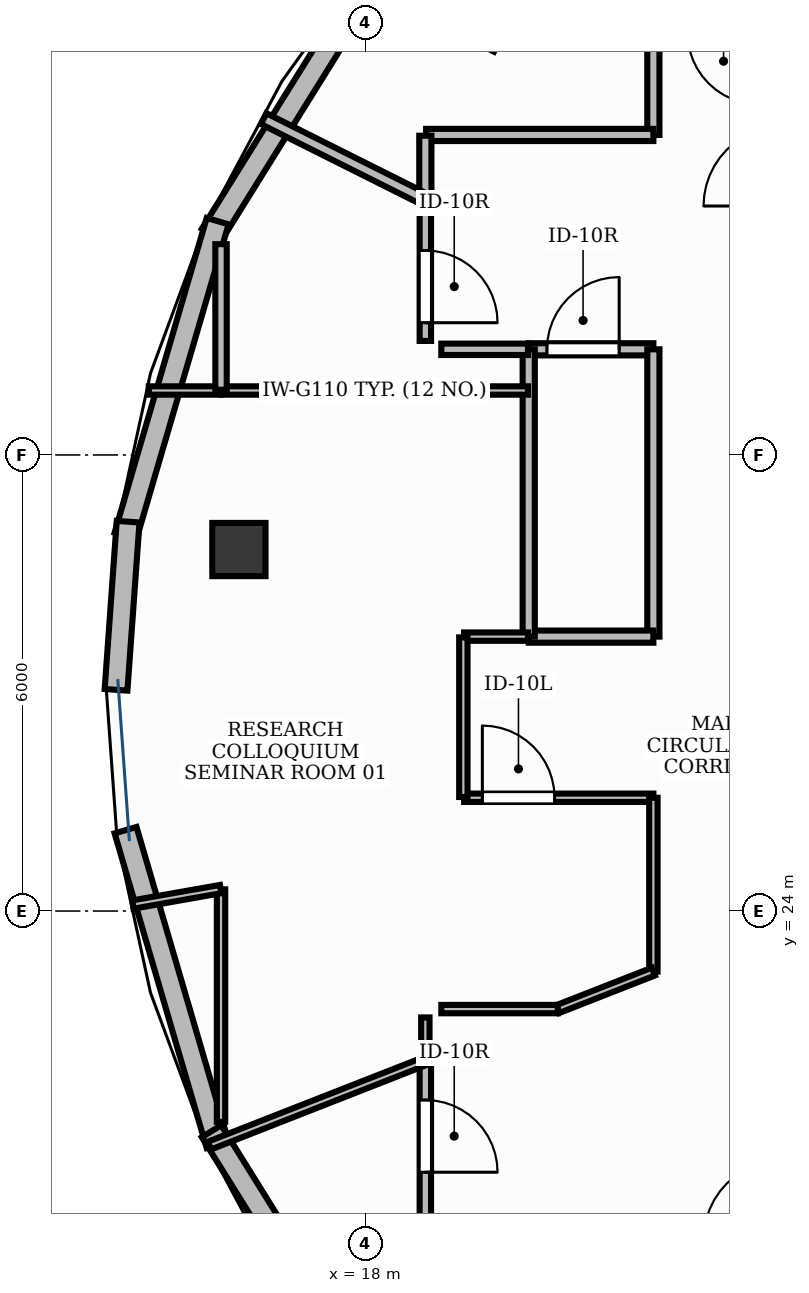
"""IFC4 building model, lengths in metres.
Left out: names, types, materials, properties, quantities, classifications, styles, units other than length and angle.
Written with IfcOpenShell. Run it as: python <this file> out.ifc"""

import sys

from ifc_helpers import new_model, si_unit, direction, frame, frame_2d, origin, origin_2d, place, context, subcontext, project, spatial, rectangle, extrude, element, fill, save


model = new_model("IFC4")
c1 = context("Model", 3, precision=1e-05, world=origin(), true_north=direction((0.0, 1.0)))
c2 = subcontext(c1, "Body", "Model", "MODEL_VIEW")
j1 = project(units=[si_unit("LENGTHUNIT", "METRE"), si_unit("PLANEANGLEUNIT", "RADIAN")], contexts=[c1])
p1 = place(None, origin())
s1 = spatial("IfcSite", under=j1, at=p1, CompositionType="ELEMENT")
p2 = place(p1, origin())
s2 = spatial("IfcBuilding", under=s1, at=p2, CompositionType="ELEMENT")
p3 = place(p2, frame((0.0, 0.0, 331.2)))
s3 = spatial("IfcBuildingStorey", under=s2, at=p3, CompositionType="ELEMENT", Elevation=331.2)
p4 = place(p3, frame((16.337, 28.756, -0.0), z_axis=(0.0, 0.0, 1.0), x_axis=(0.0, 1.0, 0.0)))
e1 = element("IfcColumn", 1, at=p4, inside=s3, PredefinedType="COLUMN", context=c2, shape_type="SweptSolid", body=[
    extrude(rectangle(XDim=0.7, YDim=0.7, at=origin_2d()), origin(), (0.0, 0.0, 1.0), 3.881),
])
p5 = place(p3, frame((18.327, 36.671, 0.0), z_axis=(0.0, 0.0, 1.0), x_axis=(-0.528532323195, -0.848913177739, 0.0)))
e2 = element("IfcWall", 2, at=p5, inside=s3, PredefinedType="STANDARD", context=c2, shape_type="SweptSolid", body=[
    extrude(rectangle(XDim=4.447, YDim=0.3, at=frame_2d((2.223, 0.0))), origin(), (0.0, 0.0, 1.0), 3.88),
])
p6 = place(p3, frame((16.057, 33.076, 0.0), z_axis=(0.0, 0.0, 1.0), x_axis=(-0.280777958988, -0.95977275318, 0.0)))
e3 = element("IfcWall", 3, at=p6, inside=s3, PredefinedType="STANDARD", context=c2, shape_type="SweptSolid", body=[
    extrude(rectangle(XDim=4.314, YDim=0.3, at=frame_2d((2.157, 0.0))), origin(), (0.0, 0.0, 1.0), 3.88),
])
p7 = place(p3, frame((14.88, 29.122, 0.0), z_axis=(0.0, 0.0, 1.0), x_axis=(-0.071669526478, -0.997428433009, 0.0)))
e4 = element("IfcWall", 4, at=p7, inside=s3, PredefinedType="STANDARD", context=c2, shape_type="SweptSolid", body=[
    extrude(rectangle(XDim=2.218, YDim=0.3, at=frame_2d((1.109, 0.0))), origin(), (0.0, 0.0, 1.0), 3.88),
])
p8 = place(p3, frame((14.846, 25.064, 0.0), z_axis=(0.0, 0.0, 1.0), x_axis=(0.280777958988, -0.95977275318, 0.0)))
e5 = element("IfcWall", 5, at=p8, inside=s3, PredefinedType="STANDARD", context=c2, shape_type="SweptSolid", body=[
    extrude(rectangle(XDim=4.314, YDim=0.3, at=frame_2d((2.157, 0.0))), origin(), (0.0, 0.0, 1.0), 3.88),
])
p9 = place(p3, frame((15.977, 21.103, 0.0), z_axis=(0.0, 0.0, 1.0), x_axis=(0.528532323195, -0.848913177739, 0.0)))
e6 = element("IfcWall", 6, at=p9, inside=s3, PredefinedType="STANDARD", context=c2, shape_type="SweptSolid", body=[
    extrude(rectangle(XDim=4.447, YDim=0.3, at=frame_2d((2.223, 0.0))), origin(), (0.0, 0.0, 1.0), 3.88),
])
p10 = place(p3, frame((20.15, 31.39, 0.0), z_axis=(0.0, 0.0, 1.0), x_axis=(1.0, 0.0, 0.0)))
e7 = element("IfcWall", 7, at=p10, inside=s3, PredefinedType="PARTITIONING", context=c2, shape_type="SweptSolid", body=[
    extrude(rectangle(XDim=1.64, YDim=0.16, at=frame_2d((0.82, 0.0))), origin(), (0.0, 0.0, 1.0), 2.22),
])
p11 = place(p10, frame((0.24, 0.0, 0.0)))
e8 = element("IfcOpeningElement", 8, at=p11, cuts=e7, PredefinedType="OPENING", context=c2, shape_type="SweptSolid", body=[
    extrude(rectangle(XDim=0.95, YDim=2.15, at=frame_2d((0.475, 1.075))), frame((0.0, 0.095, 0.0), z_axis=(0.0, -1.0, 0.0), x_axis=(1.0, 0.0, 0.0)), (0.0, 0.0, 1.0), 0.19),
])
p12 = place(p3, frame((19.3, 25.49, 0.0), z_axis=(0.0, 0.0, 1.0), x_axis=(1.0, 0.0, 0.0)))
e9 = element("IfcWall", 9, at=p12, inside=s3, PredefinedType="MOVABLE", context=c2, shape_type="SweptSolid", body=[
    extrude(rectangle(XDim=2.49, YDim=0.11, at=frame_2d((1.245, 0.0))), origin(), (0.0, 0.0, 1.0), 2.22),
])
p13 = place(p12, frame((0.24, 0.0, 0.0)))
e10 = element("IfcOpeningElement", 10, at=p13, cuts=e9, PredefinedType="OPENING", context=c2, shape_type="SweptSolid", body=[
    extrude(rectangle(XDim=0.95, YDim=2.15, at=frame_2d((0.475, 1.075))), frame((0.0, 0.07, 0.0), z_axis=(0.0, -1.0, 0.0), x_axis=(1.0, 0.0, 0.0)), (0.0, 0.0, 1.0), 0.14),
])
p14 = place(p3, frame((18.79, 22.017, 0.0), z_axis=(0.0, 0.0, 1.0), x_axis=(0.0, -1.0, 0.0)))
e11 = element("IfcWall", 11, at=p14, inside=s3, PredefinedType="PARTITIONING", context=c2, shape_type="SweptSolid", body=[
    extrude(rectangle(XDim=2.117, YDim=0.15, at=frame_2d((1.058, 0.0))), origin(), (0.0, 0.0, 1.0), 2.22),
])
p15 = place(p14, frame((0.503, 0.0, 0.0)))
e12 = element("IfcOpeningElement", 12, at=p15, cuts=e11, PredefinedType="OPENING", context=c2, shape_type="SweptSolid", body=[
    extrude(rectangle(XDim=0.95, YDim=2.15, at=frame_2d((0.475, 1.075))), frame((0.0, 0.09, 0.0), z_axis=(0.0, -1.0, 0.0), x_axis=(1.0, 0.0, 0.0)), (0.0, 0.0, 1.0), 0.18),
])
p16 = place(p3, frame((18.79, 33.349, 0.0), z_axis=(0.0, 0.0, 1.0), x_axis=(0.0, -1.0, 0.0)))
e13 = element("IfcWall", 13, at=p16, inside=s3, PredefinedType="PARTITIONING", context=c2, shape_type="SweptSolid", body=[
    extrude(rectangle(XDim=1.849, YDim=0.15, at=frame_2d((0.925, 0.0))), origin(), (0.0, 0.0, 1.0), 2.22),
])
p17 = place(p16, frame((0.659, 0.0, 0.0)))
e14 = element("IfcOpeningElement", 14, at=p17, cuts=e13, PredefinedType="OPENING", context=c2, shape_type="SweptSolid", body=[
    extrude(rectangle(XDim=0.95, YDim=2.15, at=frame_2d((0.475, 1.075))), frame((0.0, 0.09, 0.0), z_axis=(0.0, -1.0, 0.0), x_axis=(1.0, 0.0, 0.0)), (0.0, 0.0, 1.0), 0.18),
])
p18 = place(p3, frame((21.79, 31.39, 0.0), z_axis=(0.0, 0.0, 1.0), x_axis=(0.0, -1.0, 0.0)))
e15 = element("IfcWall", 15, at=p18, inside=s3, PredefinedType="PARTITIONING", context=c2, shape_type="SweptSolid", body=[
    extrude(rectangle(XDim=3.78, YDim=0.16, at=frame_2d((1.89, 0.0))), origin(), (0.0, 0.0, 1.0), 2.22),
])
p19 = place(p3, frame((21.79, 27.61, 0.0), z_axis=(0.0, 0.0, 1.0), x_axis=(-1.0, 0.0, 0.0)))
e16 = element("IfcWall", 16, at=p19, inside=s3, PredefinedType="PARTITIONING", context=c2, shape_type="SweptSolid", body=[
    extrude(rectangle(XDim=1.64, YDim=0.16, at=frame_2d((0.82, 0.0))), origin(), (0.0, 0.0, 1.0), 2.22),
])
p20 = place(p3, frame((20.15, 27.61, 0.0), z_axis=(0.0, 0.0, 1.0), x_axis=(0.0, 1.0, 0.0)))
e17 = element("IfcWall", 17, at=p20, inside=s3, PredefinedType="PARTITIONING", context=c2, shape_type="SweptSolid", body=[
    extrude(rectangle(XDim=3.78, YDim=0.16, at=frame_2d((1.89, 0.0))), origin(), (0.0, 0.0, 1.0), 2.22),
])
p21 = place(p3, frame((15.152, 30.848, 0.0), z_axis=(0.0, 0.0, 1.0), x_axis=(1.0, 0.0, 0.0)))
e18 = element("IfcWall", 18, at=p21, inside=s3, PredefinedType="MOVABLE", context=c2, shape_type="SweptSolid", body=[
    extrude(rectangle(XDim=0.946, YDim=0.11, at=frame_2d((0.473, 0.0))), origin(), (0.0, 0.0, 1.0), 2.22),
])
p22 = place(p3, frame((16.102, 30.848, 0.0), z_axis=(0.0, 0.0, 1.0), x_axis=(1.0, 0.0, 0.0)))
e19 = element("IfcWall", 19, at=p22, inside=s3, PredefinedType="MOVABLE", context=c2, shape_type="SweptSolid", body=[
    extrude(rectangle(XDim=4.038, YDim=0.11, at=frame_2d((2.019, 0.0))), origin(), (0.0, 0.0, 1.0), 2.22),
])
p23 = place(p3, frame((20.14, 27.61, 0.0), z_axis=(0.0, 0.0, 1.0), x_axis=(-1.0, 0.0, 0.0)))
e20 = element("IfcWall", 20, at=p23, inside=s3, PredefinedType="MOVABLE", context=c2, shape_type="SweptSolid", body=[
    extrude(rectangle(XDim=0.84, YDim=0.11, at=frame_2d((0.42, 0.0))), origin(), (0.0, 0.0, 1.0), 2.22),
])
p24 = place(p3, frame((19.29, 27.6, 0.0), z_axis=(0.0, 0.0, 1.0), x_axis=(0.0, -1.0, 0.0)))
e21 = element("IfcWall", 21, at=p24, inside=s3, PredefinedType="MOVABLE", context=c2, shape_type="SweptSolid", body=[
    extrude(rectangle(XDim=2.1, YDim=0.11, at=frame_2d((1.05, 0.0))), origin(), (0.0, 0.0, 1.0), 2.22),
])
p25 = place(p3, frame((21.79, 25.49, 0.0), z_axis=(0.0, 0.0, 1.0), x_axis=(0.0, -1.0, 0.0)))
e22 = element("IfcWall", 22, at=p25, inside=s3, PredefinedType="MOVABLE", context=c2, shape_type="SweptSolid", body=[
    extrude(rectangle(XDim=2.287, YDim=0.11, at=frame_2d((1.144, 0.0))), origin(), (0.0, 0.0, 1.0), 2.22),
])
p26 = place(p3, frame((21.79, 23.203, 0.0), z_axis=(0.0, 0.0, 1.0), x_axis=(-0.931045414271, -0.364903324957, 0.0)))
e23 = element("IfcWall", 23, at=p26, inside=s3, PredefinedType="MOVABLE", context=c2, shape_type="SweptSolid", body=[
    extrude(rectangle(XDim=1.352, YDim=0.11, at=frame_2d((0.676, 0.0))), origin(), (0.0, 0.0, 1.0), 2.22),
])
p27 = place(p3, frame((20.532, 22.71, 0.0), z_axis=(0.0, 0.0, 1.0), x_axis=(-1.0, 0.0, 0.0)))
e24 = element("IfcWall", 24, at=p27, inside=s3, PredefinedType="MOVABLE", context=c2, shape_type="SweptSolid", body=[
    extrude(rectangle(XDim=1.532, YDim=0.11, at=frame_2d((0.766, 0.0))), origin(), (0.0, 0.0, 1.0), 2.22),
])
p28 = place(p3, frame((18.79, 22.6, 0.0), z_axis=(0.0, 0.0, 1.0), x_axis=(0.0, -1.0, 0.0)))
e25 = element("IfcWall", 25, at=p28, inside=s3, PredefinedType="MOVABLE", context=c2, shape_type="SweptSolid", body=[
    extrude(rectangle(XDim=0.573, YDim=0.11, at=frame_2d((0.286, 0.0))), origin(), (0.0, 0.0, 1.0), 2.22),
])
p29 = place(p3, frame((18.79, 22.027, 0.0), z_axis=(0.0, 0.0, 1.0), x_axis=(-0.931059597412, -0.364867134813, 0.0)))
e26 = element("IfcWall", 26, at=p29, inside=s3, PredefinedType="MOVABLE", context=c2, shape_type="SweptSolid", body=[
    extrude(rectangle(XDim=3.05, YDim=0.11, at=frame_2d((1.525, 0.0))), origin(), (0.0, 0.0, 1.0), 2.22),
])
p30 = place(p3, frame((16.102, 21.227, 0.0), z_axis=(0.0, 0.0, 1.0), x_axis=(0.0, 1.0, 0.0)))
e27 = element("IfcWall", 27, at=p30, inside=s3, PredefinedType="MOVABLE", context=c2, shape_type="SweptSolid", body=[
    extrude(rectangle(XDim=3.058, YDim=0.11, at=frame_2d((1.529, 0.0))), origin(), (0.0, 0.0, 1.0), 2.22),
])
p31 = place(p3, frame((16.097, 24.289, 0.0), z_axis=(0.0, 0.0, 1.0), x_axis=(-0.984814976585, -0.173607205765, 0.0)))
e28 = element("IfcWall", 28, at=p31, inside=s3, PredefinedType="MOVABLE", context=c2, shape_type="SweptSolid", body=[
    extrude(rectangle(XDim=1.173, YDim=0.11, at=frame_2d((0.586, 0.0))), origin(), (0.0, 0.0, 1.0), 2.22),
])
p32 = place(p3, frame((21.79, 35.55, 0.0), z_axis=(0.0, 0.0, 1.0), x_axis=(0.0, -1.0, 0.0)))
e29 = element("IfcWall", 29, at=p32, inside=s3, PredefinedType="PARTITIONING", context=c2, shape_type="SweptSolid", body=[
    extrude(rectangle(XDim=1.34, YDim=0.16, at=frame_2d((0.67, 0.0))), origin(), (0.0, 0.0, 1.0), 2.22),
])
p33 = place(p3, frame((21.79, 34.21, 0.0), z_axis=(0.0, 0.0, 1.0), x_axis=(-1.0, 0.0, 0.0)))
e30 = element("IfcWall", 30, at=p33, inside=s3, PredefinedType="PARTITIONING", context=c2, shape_type="SweptSolid", body=[
    extrude(rectangle(XDim=2.99, YDim=0.16, at=frame_2d((1.495, 0.0))), origin(), (0.0, 0.0, 1.0), 2.22),
])
p34 = place(p3, frame((18.79, 34.2, 0.0), z_axis=(0.0, 0.0, 1.0), x_axis=(0.0, -1.0, 0.0)))
e31 = element("IfcWall", 31, at=p34, inside=s3, PredefinedType="PARTITIONING", context=c2, shape_type="SweptSolid", body=[
    extrude(rectangle(XDim=0.841, YDim=0.16, at=frame_2d((0.42, 0.0))), origin(), (0.0, 0.0, 1.0), 2.22),
])
p35 = place(p3, frame((18.79, 33.359, 0.0), z_axis=(0.0, 0.0, 1.0), x_axis=(-0.894139633637, 0.447788248572, 0.0)))
e32 = element("IfcWall", 32, at=p35, inside=s3, PredefinedType="PARTITIONING", context=c2, shape_type="SweptSolid", body=[
    extrude(rectangle(XDim=2.379, YDim=0.16, at=frame_2d((1.189, 0.0))), origin(), (0.0, 0.0, 1.0), 2.22),
])
p36 = place(p3, frame((19.0, 31.39, 0.0), z_axis=(0.0, 0.0, 1.0), x_axis=(1.0, 0.0, 0.0)))
e33 = element("IfcWall", 33, at=p36, inside=s3, PredefinedType="PARTITIONING", context=c2, shape_type="SweptSolid", body=[
    extrude(rectangle(XDim=1.14, YDim=0.15, at=frame_2d((0.57, 0.0))), origin(), (0.0, 0.0, 1.0), 2.22),
])
p37 = place(p3, frame((16.102, 30.858, 0.0), z_axis=(0.0, 0.0, 1.0), x_axis=(0.0, 1.0, 0.0)))
e34 = element("IfcWall", 34, at=p37, inside=s3, PredefinedType="PARTITIONING", context=c2, shape_type="SweptSolid", body=[
    extrude(rectangle(XDim=1.916, YDim=0.15, at=frame_2d((0.958, 0.0))), origin(), (0.0, 0.0, 1.0), 2.22),
])
p38 = place(p11, origin())
e35 = element("IfcDoor", 35, at=p38, inside=s3, OperationType="SINGLE_SWING_RIGHT", PredefinedType="DOOR", context=c2, shape_type="SweptSolid", body=[
    extrude(rectangle(XDim=0.95, YDim=2.15, at=frame_2d((0.475, 1.075))), frame((0.0, 0.025, 0.0), z_axis=(0.0, -1.0, 0.0), x_axis=(1.0, 0.0, 0.0)), (0.0, 0.0, 1.0), 0.05),
])
fill(e8, e35)
p39 = place(p13, origin())
e36 = element("IfcDoor", 36, at=p39, inside=s3, OperationType="SINGLE_SWING_LEFT", PredefinedType="DOOR", context=c2, shape_type="SweptSolid", body=[
    extrude(rectangle(XDim=0.95, YDim=2.15, at=frame_2d((0.475, 1.075))), frame((0.0, 0.025, 0.0), z_axis=(0.0, -1.0, 0.0), x_axis=(1.0, 0.0, 0.0)), (0.0, 0.0, 1.0), 0.05),
])
fill(e10, e36)
p40 = place(p15, origin())
e37 = element("IfcDoor", 37, at=p40, inside=s3, OperationType="SINGLE_SWING_RIGHT", PredefinedType="DOOR", context=c2, shape_type="SweptSolid", body=[
    extrude(rectangle(XDim=0.95, YDim=2.15, at=frame_2d((0.475, 1.075))), frame((0.0, 0.025, 0.0), z_axis=(0.0, -1.0, 0.0), x_axis=(1.0, 0.0, 0.0)), (0.0, 0.0, 1.0), 0.05),
])
fill(e12, e37)
p41 = place(p17, origin())
e38 = element("IfcDoor", 38, at=p41, inside=s3, OperationType="SINGLE_SWING_RIGHT", PredefinedType="DOOR", context=c2, shape_type="SweptSolid", body=[
    extrude(rectangle(XDim=0.95, YDim=2.15, at=frame_2d((0.475, 1.075))), frame((0.0, 0.025, 0.0), z_axis=(0.0, -1.0, 0.0), x_axis=(1.0, 0.0, 0.0)), (0.0, 0.0, 1.0), 0.05),
])
fill(e14, e38)
save(model, sys.argv[1])
